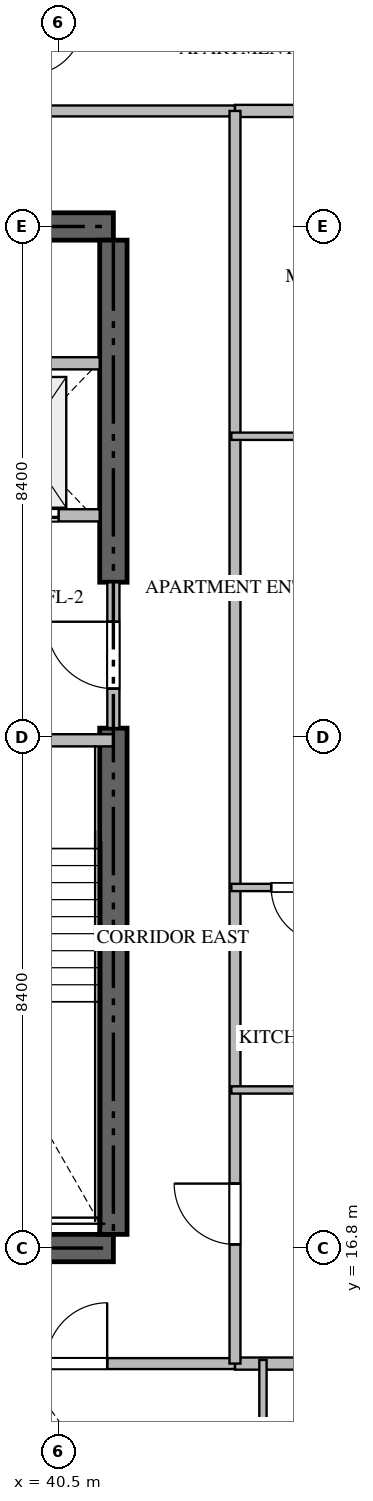
"""IFC4 building model, lengths in metres.
Left out: names, types, materials, properties, quantities, classifications, styles, units other than length and angle.
Written with IfcOpenShell. Run it as: python <this file> out.ifc"""

import sys

from ifc_helpers import new_model, si_unit, direction, frame, frame_2d, origin, place, context, subcontext, project, spatial, rectangle, extrude, source, transform, mapped, element, fill, save


model = new_model("IFC4")
c1 = context("Model", 3, precision=1e-05, world=origin(), true_north=direction((0.0, 1.0)))
c2 = subcontext(c1, "Body", "Model", "MODEL_VIEW")
j1 = project(units=[si_unit("LENGTHUNIT", "METRE"), si_unit("PLANEANGLEUNIT", "RADIAN")], contexts=[c1])
p1 = place(None, origin())
s1 = spatial("IfcSite", under=j1, at=p1, CompositionType="ELEMENT")
p2 = place(p1, origin())
s2 = spatial("IfcBuilding", under=s1, at=p2, CompositionType="ELEMENT")
p3 = place(p2, frame((0.0, 0.0, 86.7)))
s3 = spatial("IfcBuildingStorey", under=s2, at=p3, CompositionType="ELEMENT", Elevation=86.7)
for number, where, z_axis, x_axis in (
    (1, (23.4, 16.8, -0.26), (0.0, 0.0, 1.0), (1.0, 0.0, 0.0)),
    (2, (41.4, 33.6, -0.26), (0.0, 0.0, 1.0), (-1.0, 0.0, 0.0)),
):
    element("IfcWall", number, at=place(p3, frame(where, z_axis=z_axis, x_axis=x_axis)), inside=s3, PredefinedType="SHEAR", context=c2, shape_type="SweptSolid", body=[
        extrude(rectangle(XDim=18.0, YDim=0.45, at=frame_2d((9.0, 0.0))), origin(), (0.0, 0.0, 1.0), 3.748),
    ])
p4 = place(p3, frame((41.4, 17.025, -0.26), z_axis=(0.0, 0.0, 1.0), x_axis=(0.0, 1.0, 0.0)))
e3 = element("IfcWall", 3, at=p4, inside=s3, PredefinedType="SHEAR", context=c2, shape_type="SweptSolid", body=[
    extrude(rectangle(XDim=8.325, YDim=0.45, at=frame_2d((4.163, 0.0))), origin(), (0.0, 0.0, 1.0), 3.748),
])
p5 = place(p3, frame((41.4, 27.75, -0.26), z_axis=(0.0, 0.0, 1.0), x_axis=(0.0, 1.0, 0.0)))
e4 = element("IfcWall", 4, at=p5, inside=s3, PredefinedType="SHEAR", context=c2, shape_type="SweptSolid", body=[
    extrude(rectangle(XDim=5.625, YDim=0.45, at=frame_2d((2.812, 0.0))), origin(), (0.0, 0.0, 1.0), 3.748),
])
p6 = place(p3, frame((36.95, 25.15, 0.0), z_axis=(0.0, 0.0, 1.0), x_axis=(1.0, 0.0, 0.0)))
e5 = element("IfcWall", 5, at=p6, inside=s3, PredefinedType="STANDARD", context=c2, shape_type="SweptSolid", body=[
    extrude(rectangle(XDim=4.45, YDim=0.2, at=frame_2d((2.225, 0.0))), origin(), (0.0, 0.0, 1.0), 3.49),
])
p7 = place(p6, frame((1.65, 0.0, 0.0)))
e6 = element("IfcOpeningElement", 6, at=p7, cuts=e5, PredefinedType="OPENING", context=c2, shape_type="SweptSolid", body=[
    extrude(rectangle(XDim=1.1, YDim=2.15, at=frame_2d((0.55, 1.075))), frame((0.0, 0.11, 0.0), z_axis=(0.0, -1.0, 0.0), x_axis=(1.0, 0.0, 0.0)), (0.0, 0.0, 1.0), 0.22),
])
p8 = place(p3, frame((38.75, 28.85, 0.0), z_axis=(0.0, 0.0, 1.0), x_axis=(1.0, 0.0, 0.0)))
e7 = element("IfcWall", 7, at=p8, inside=s3, PredefinedType="STANDARD", context=c2, shape_type="SweptSolid", body=[
    extrude(rectangle(XDim=2.425, YDim=0.2, at=frame_2d((1.212, 0.0))), origin(), (0.0, 0.0, 1.0), 3.49),
])
p9 = place(p8, frame((0.55, 0.0, 0.0)))
e8 = element("IfcOpeningElement", 8, at=p9, cuts=e7, PredefinedType="OPENING", context=c2, shape_type="SweptSolid", body=[
    extrude(rectangle(XDim=1.2, YDim=2.2, at=frame_2d((0.6, 1.1))), frame((0.0, 0.11, 0.0), z_axis=(0.0, -1.0, 0.0), x_axis=(1.0, 0.0, 0.0)), (0.0, 0.0, 1.0), 0.22),
])
p10 = place(p3, frame((38.75, 31.35, 0.0), z_axis=(0.0, 0.0, 1.0), x_axis=(1.0, 0.0, 0.0)))
e9 = element("IfcWall", 9, at=p10, inside=s3, PredefinedType="STANDARD", context=c2, shape_type="SweptSolid", body=[
    extrude(rectangle(XDim=2.425, YDim=0.2, at=frame_2d((1.212, 0.0))), origin(), (0.0, 0.0, 1.0), 3.49),
])
p11 = place(p3, frame((41.4, 25.352, 0.0), z_axis=(0.0, 0.0, 1.0), x_axis=(0.0, 1.0, 0.0)))
e10 = element("IfcWall", 10, at=p11, inside=s3, PredefinedType="STANDARD", context=c2, shape_type="SweptSolid", body=[
    extrude(rectangle(XDim=2.396, YDim=0.2, at=frame_2d((1.198, 0.0))), origin(), (0.0, 0.0, 1.0), 3.49),
])
p12 = place(p11, frame((0.648, 0.0, 0.0)))
e11 = element("IfcOpeningElement", 11, at=p12, cuts=e10, PredefinedType="OPENING", context=c2, shape_type="SweptSolid", body=[
    extrude(rectangle(XDim=1.1, YDim=2.15, at=frame_2d((0.55, 1.075))), frame((0.0, 0.11, 0.0), z_axis=(0.0, -1.0, 0.0), x_axis=(1.0, 0.0, 0.0)), (0.0, 0.0, 1.0), 0.22),
])
for number, where, z_axis, x_axis in (
    (12, (43.4, 14.9, 0.0), (0.0, 0.0, 1.0), (1.0, 0.0, 0.0)),
    (13, (43.4, 35.5, 0.0), (0.0, 0.0, 1.0), (1.0, 0.0, 0.0)),
):
    element("IfcWall", number, at=place(p3, frame(where, z_axis=z_axis, x_axis=x_axis)), inside=s3, PredefinedType="PARTITIONING", context=c2, shape_type="SweptSolid", body=[
        extrude(rectangle(XDim=15.318, YDim=0.2, at=frame_2d((7.659, 0.0))), origin(), (0.0, 0.0, 1.0), 3.49),
    ])
p13 = place(p3, frame((21.402, 14.9, 0.0), z_axis=(0.0, 0.0, 1.0), x_axis=(1.0, 0.0, 0.0)))
e14 = element("IfcWall", 14, at=p13, inside=s3, PredefinedType="PARTITIONING", context=c2, shape_type="SweptSolid", body=[
    extrude(rectangle(XDim=21.996, YDim=0.18, at=frame_2d((10.998, 0.0))), origin(), (0.0, 0.0, 1.0), 3.49),
])
p14 = place(p13, frame((1.82, 0.0, 0.0)))
e15 = element("IfcOpeningElement", 15, at=p14, cuts=e14, PredefinedType="OPENING", context=c2, shape_type="SweptSolid", body=[
    extrude(rectangle(XDim=1.0, YDim=2.15, at=frame_2d((0.5, 1.075))), frame((0.0, 0.1, 0.0), z_axis=(0.0, -1.0, 0.0), x_axis=(1.0, 0.0, 0.0)), (0.0, 0.0, 1.0), 0.2),
])
p15 = place(p13, frame((5.144, 0.0, 0.0)))
e16 = element("IfcOpeningElement", 16, at=p15, cuts=e14, PredefinedType="OPENING", context=c2, shape_type="SweptSolid", body=[
    extrude(rectangle(XDim=1.0, YDim=2.15, at=frame_2d((0.5, 1.075))), frame((0.0, 0.1, 0.0), z_axis=(0.0, -1.0, 0.0), x_axis=(1.0, 0.0, 0.0)), (0.0, 0.0, 1.0), 0.2),
])
p16 = place(p13, frame((11.758, 0.0, 0.0)))
e17 = element("IfcOpeningElement", 17, at=p16, cuts=e14, PredefinedType="OPENING", context=c2, shape_type="SweptSolid", body=[
    extrude(rectangle(XDim=1.0, YDim=2.15, at=frame_2d((0.5, 1.075))), frame((0.0, 0.1, 0.0), z_axis=(0.0, -1.0, 0.0), x_axis=(1.0, 0.0, 0.0)), (0.0, 0.0, 1.0), 0.2),
])
p17 = place(p13, frame((18.896, 0.0, 0.0)))
e18 = element("IfcOpeningElement", 18, at=p17, cuts=e14, PredefinedType="OPENING", context=c2, shape_type="SweptSolid", body=[
    extrude(rectangle(XDim=1.0, YDim=2.15, at=frame_2d((0.5, 1.075))), frame((0.0, 0.1, 0.0), z_axis=(0.0, -1.0, 0.0), x_axis=(1.0, 0.0, 0.0)), (0.0, 0.0, 1.0), 0.2),
])
p18 = place(p3, frame((21.402, 35.5, 0.0), z_axis=(0.0, 0.0, 1.0), x_axis=(1.0, 0.0, 0.0)))
e19 = element("IfcWall", 19, at=p18, inside=s3, PredefinedType="PARTITIONING", context=c2, shape_type="SweptSolid", body=[
    extrude(rectangle(XDim=21.996, YDim=0.18, at=frame_2d((10.998, 0.0))), origin(), (0.0, 0.0, 1.0), 3.49),
])
p19 = place(p18, frame((15.222, 0.0, 0.0)))
e20 = element("IfcOpeningElement", 20, at=p19, cuts=e19, PredefinedType="OPENING", context=c2, shape_type="SweptSolid", body=[
    extrude(rectangle(XDim=1.0, YDim=2.15, at=frame_2d((0.5, 1.075))), frame((0.0, 0.1, 0.0), z_axis=(0.0, -1.0, 0.0), x_axis=(1.0, 0.0, 0.0)), (0.0, 0.0, 1.0), 0.2),
])
p20 = place(p3, frame((43.4, 14.9, 0.0), z_axis=(0.0, 0.0, 1.0), x_axis=(0.0, 1.0, 0.0)))
e21 = element("IfcWall", 21, at=p20, inside=s3, PredefinedType="PARTITIONING", context=c2, shape_type="SweptSolid", body=[
    extrude(rectangle(XDim=20.6, YDim=0.18, at=frame_2d((10.3, 0.0))), origin(), (0.0, 0.0, 1.0), 3.49),
])
p21 = place(p20, frame((1.96, 0.0, 0.0)))
e22 = element("IfcOpeningElement", 22, at=p21, cuts=e21, PredefinedType="OPENING", context=c2, shape_type="SweptSolid", body=[
    extrude(rectangle(XDim=1.0, YDim=2.15, at=frame_2d((0.5, 1.075))), frame((0.0, 0.1, 0.0), z_axis=(0.0, -1.0, 0.0), x_axis=(1.0, 0.0, 0.0)), (0.0, 0.0, 1.0), 0.2),
])
p22 = place(p3, frame((43.86, 12.15, 0.0), z_axis=(0.0, 0.0, 1.0), x_axis=(0.0, 1.0, 0.0)))
e23 = element("IfcWall", 23, at=p22, inside=s3, PredefinedType="PARTITIONING", context=c2, shape_type="SweptSolid", body=[
    extrude(rectangle(XDim=2.81, YDim=0.12, at=frame_2d((1.405, 0.0))), origin(), (0.0, 0.0, 1.0), 3.49),
])
p23 = place(p3, frame((46.15, 19.4, 0.0), z_axis=(0.0, 0.0, 1.0), x_axis=(-1.0, 0.0, 0.0)))
e24 = element("IfcWall", 24, at=p23, inside=s3, PredefinedType="PARTITIONING", context=c2, shape_type="SweptSolid", body=[
    extrude(rectangle(XDim=2.81, YDim=0.12, at=frame_2d((1.405, 0.0))), origin(), (0.0, 0.0, 1.0), 3.49),
])
p24 = place(p3, frame((45.55, 22.73, 0.0), z_axis=(0.0, 0.0, 1.0), x_axis=(-1.0, 0.0, 0.0)))
e25 = element("IfcWall", 25, at=p24, inside=s3, PredefinedType="PARTITIONING", context=c2, shape_type="SweptSolid", body=[
    extrude(rectangle(XDim=2.21, YDim=0.12, at=frame_2d((1.105, 0.0))), origin(), (0.0, 0.0, 1.0), 3.49),
])
p25 = place(p24, frame((0.655, 0.0, 0.0)))
e26 = element("IfcOpeningElement", 26, at=p25, cuts=e25, PredefinedType="OPENING", context=c2, shape_type="SweptSolid", body=[
    extrude(rectangle(XDim=0.9, YDim=2.1, at=frame_2d((0.45, 1.05))), frame((0.0, 0.07, 0.0), z_axis=(0.0, -1.0, 0.0), x_axis=(1.0, 0.0, 0.0)), (0.0, 0.0, 1.0), 0.14),
])
p26 = place(p3, frame((45.548, 30.15, 0.0), z_axis=(0.0, 0.0, 1.0), x_axis=(-1.0, 0.0, 0.0)))
e27 = element("IfcWall", 27, at=p26, inside=s3, PredefinedType="PARTITIONING", context=c2, shape_type="SweptSolid", body=[
    extrude(rectangle(XDim=2.208, YDim=0.12, at=frame_2d((1.104, 0.0))), origin(), (0.0, 0.0, 1.0), 3.49),
])
m1 = source(origin(), c2, "Body", "SweptSolid", [
    extrude(rectangle(XDim=1.2, YDim=2.2, at=frame_2d((0.6, 1.1))), frame((0.0, 0.025, 0.0), z_axis=(0.0, -1.0, 0.0), x_axis=(1.0, 0.0, 0.0)), (0.0, 0.0, 1.0), 0.05),
])
p27 = place(p9, origin())
e28 = element("IfcDoor", 28, at=p27, inside=s3, OperationType="DOUBLE_DOOR_SLIDING", PredefinedType="DOOR", context=c2, shape_type="MappedRepresentation", body=[
    mapped(m1, transform((0.0, 0.0, 0.0), scale=1.0)),
])
fill(e8, e28)
m2 = source(origin(), c2, "Body", "SweptSolid", [
    extrude(rectangle(XDim=1.1, YDim=2.15, at=frame_2d((0.55, 1.075))), frame((0.0, 0.025, 0.0), z_axis=(0.0, -1.0, 0.0), x_axis=(1.0, 0.0, 0.0)), (0.0, 0.0, 1.0), 0.05),
])
p28 = place(p12, origin())
e29 = element("IfcDoor", 29, at=p28, inside=s3, OperationType="SINGLE_SWING_RIGHT", PredefinedType="DOOR", context=c2, shape_type="MappedRepresentation", body=[
    mapped(m2, transform((0.0, 0.0, 0.0), scale=1.0)),
])
fill(e11, e29)
m3 = source(origin(), c2, "Body", "SweptSolid", [
    extrude(rectangle(XDim=1.0, YDim=2.15, at=frame_2d((0.5, 1.075))), frame((0.0, 0.025, 0.0), z_axis=(0.0, -1.0, 0.0), x_axis=(1.0, 0.0, 0.0)), (0.0, 0.0, 1.0), 0.05),
])
p29 = place(p17, origin())
e30 = element("IfcDoor", 30, at=p29, inside=s3, OperationType="SINGLE_SWING_RIGHT", PredefinedType="DOOR", context=c2, shape_type="MappedRepresentation", body=[
    mapped(m3, transform((0.0, 0.0, 0.0), scale=1.0)),
])
fill(e18, e30)
p30 = place(p21, origin())
e31 = element("IfcDoor", 31, at=p30, inside=s3, OperationType="SINGLE_SWING_RIGHT", PredefinedType="DOOR", context=c2, shape_type="MappedRepresentation", body=[
    mapped(m3, transform((0.0, 0.0, 0.0), scale=1.0)),
])
fill(e22, e31)
m4 = source(origin(), c2, "Body", "SweptSolid", [
    extrude(rectangle(XDim=0.9, YDim=2.1, at=frame_2d((0.45, 1.05))), frame((0.0, 0.025, 0.0), z_axis=(0.0, -1.0, 0.0), x_axis=(1.0, 0.0, 0.0)), (0.0, 0.0, 1.0), 0.05),
])
p31 = place(p25, origin())
e32 = element("IfcDoor", 32, at=p31, inside=s3, OperationType="SINGLE_SWING_LEFT", PredefinedType="DOOR", context=c2, shape_type="MappedRepresentation", body=[
    mapped(m4, transform((0.0, 0.0, 0.0), scale=1.0)),
])
fill(e26, e32)
save(model, sys.argv[1])
